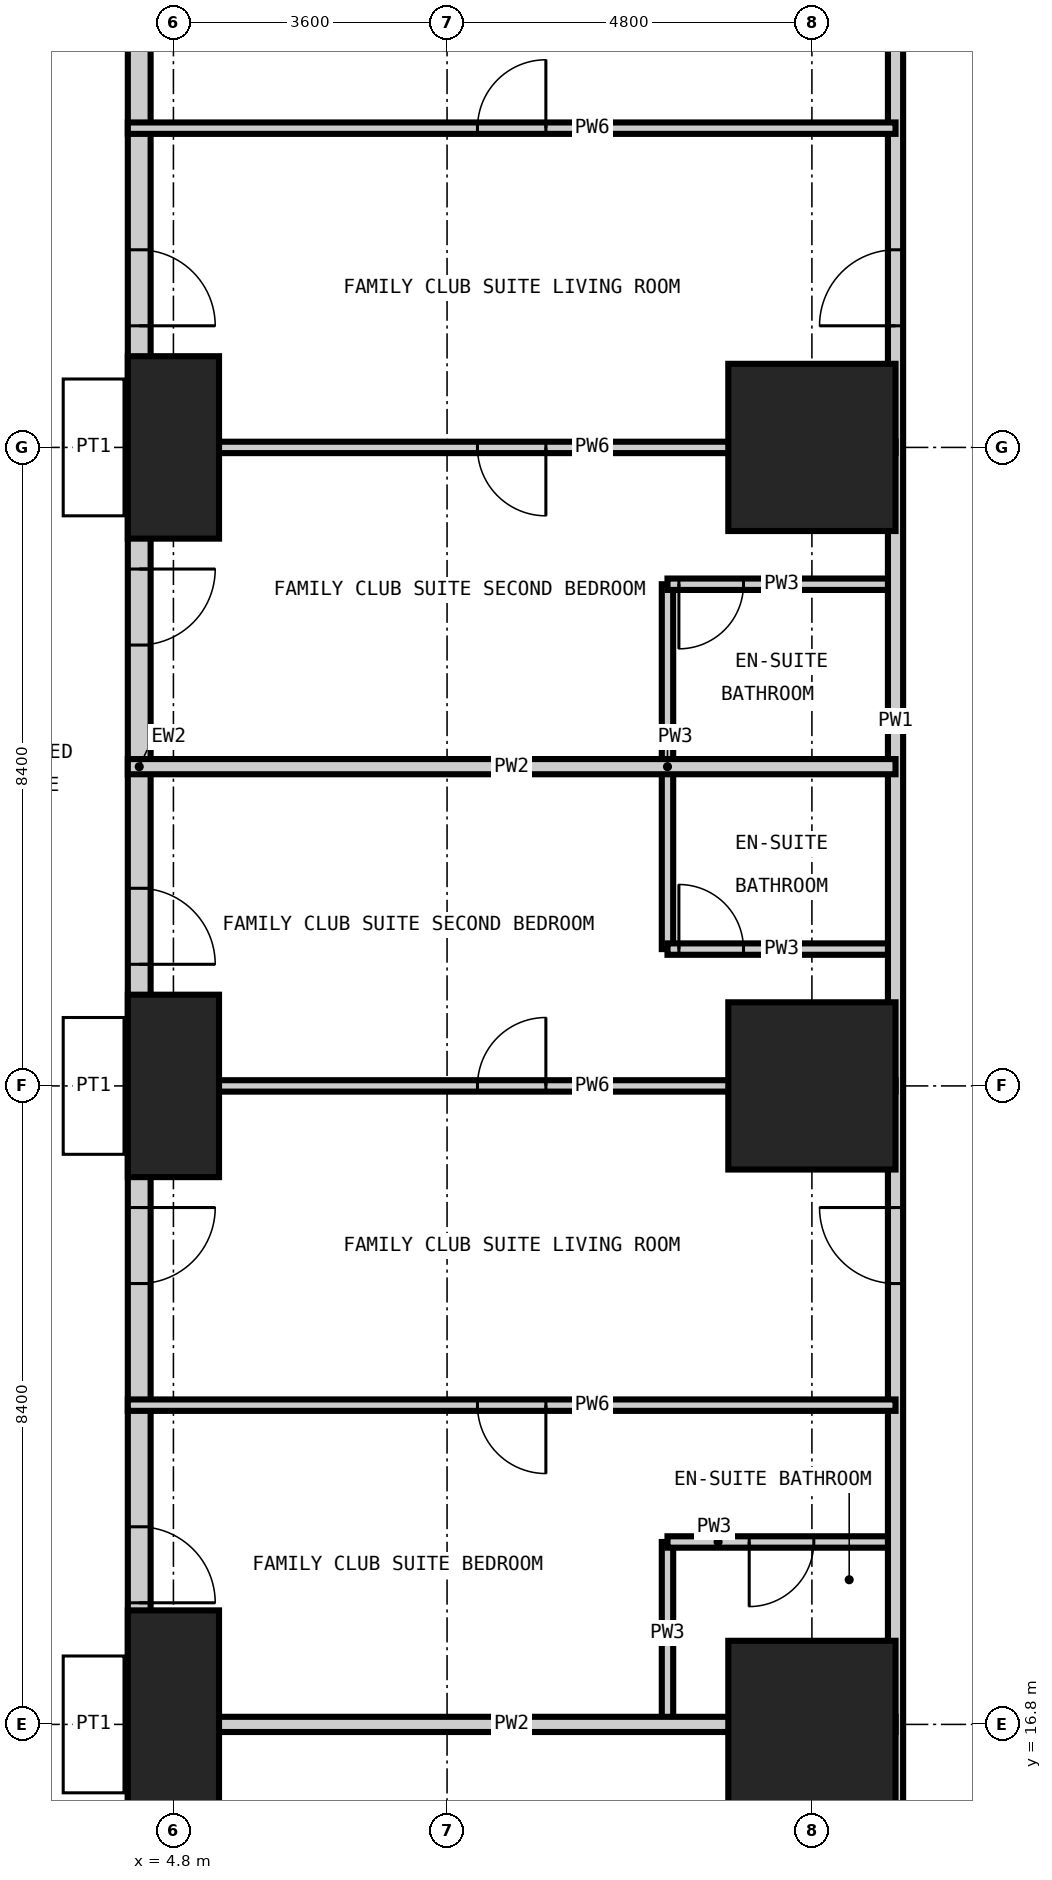
"""IFC4 building model, lengths in metres.
Left out: names, types, materials, properties, quantities, classifications, styles, units other than length and angle.
Written with IfcOpenShell. Run it as: python <this file> out.ifc"""

import sys

from ifc_helpers import new_model, si_unit, direction, frame, frame_2d, origin, origin_2d, place, context, subcontext, project, spatial, rectangle, extrude, element, fill, save


model = new_model("IFC4")
c1 = context("Model", 3, precision=1e-05, world=origin(), true_north=direction((0.0, 1.0)))
c2 = subcontext(c1, "Body", "Model", "MODEL_VIEW")
j1 = project(units=[si_unit("LENGTHUNIT", "METRE"), si_unit("PLANEANGLEUNIT", "RADIAN")], contexts=[c1])
p1 = place(None, origin())
s1 = spatial("IfcSite", under=j1, at=p1, CompositionType="ELEMENT")
p2 = place(p1, origin())
s2 = spatial("IfcBuilding", under=s1, at=p2, CompositionType="ELEMENT")
p3 = place(p2, frame((0.0, 0.0, 159.0)))
s3 = spatial("IfcBuildingStorey", under=s2, at=p3, CompositionType="ELEMENT", Elevation=159.0)
p4 = place(p3, frame((4.8, 16.8, -0.35), z_axis=(0.0, 0.0, 1.0), x_axis=(1.0, 0.0, 0.0)))
e1 = element("IfcColumn", 1, at=p4, inside=s3, PredefinedType="COLUMN", context=c2, shape_type="SweptSolid", body=[
    extrude(rectangle(XDim=1.2, YDim=3.0, at=origin_2d()), origin(), (0.0, 0.0, 1.0), 3.6),
])
for number, where, z_axis, x_axis in (
    (2, (4.8, 25.2, -0.35), (0.0, 0.0, 1.0), (1.0, 0.0, 0.0)),
    (3, (4.8, 33.6, -0.35), (0.0, 0.0, 1.0), (1.0, 0.0, 0.0)),
):
    element("IfcColumn", number, at=place(p3, frame(where, z_axis=z_axis, x_axis=x_axis)), inside=s3, PredefinedType="COLUMN", context=c2, shape_type="SweptSolid", body=[
        extrude(rectangle(XDim=1.2, YDim=2.4, at=origin_2d()), origin(), (0.0, 0.0, 1.0), 3.6),
    ])
for number, where, z_axis, x_axis in (
    (4, (13.2, 16.8, -0.35), (0.0, 0.0, 1.0), (1.0, 0.0, 0.0)),
    (5, (13.2, 25.2, -0.35), (0.0, 0.0, 1.0), (1.0, 0.0, 0.0)),
    (6, (13.2, 33.6, -0.35), (0.0, 0.0, 1.0), (1.0, 0.0, 0.0)),
):
    element("IfcColumn", number, at=place(p3, frame(where, z_axis=z_axis, x_axis=x_axis)), inside=s3, PredefinedType="COLUMN", context=c2, shape_type="SweptSolid", body=[
        extrude(rectangle(XDim=2.2, YDim=2.2, at=origin_2d()), origin(), (0.0, 0.0, 1.0), 3.6),
    ])
p5 = place(p3, frame((4.35, 51.9, 0.0), z_axis=(0.0, 0.0, 1.0), x_axis=(0.0, -1.0, 0.0)))
e7 = element("IfcWall", 7, at=p5, inside=s3, PredefinedType="SOLIDWALL", context=c2, shape_type="SweptSolid", body=[
    extrude(rectangle(XDim=45.0, YDim=0.3, at=frame_2d((22.5, 0.0))), origin(), (0.0, 0.0, 1.0), 3.25),
])
p6 = place(p5, frame((41.25, 0.0, 0.0)))
e8 = element("IfcOpeningElement", 8, at=p6, cuts=e7, PredefinedType="OPENING", context=c2, shape_type="SweptSolid", body=[
    extrude(rectangle(XDim=1.0, YDim=2.4, at=frame_2d((0.5, 1.2))), frame((0.0, 0.16, 0.0), z_axis=(0.0, -1.0, 0.0), x_axis=(1.0, 0.0, 0.0)), (0.0, 0.0, 1.0), 0.32),
])
p7 = place(p5, frame((36.7, 0.0, 0.0)))
e9 = element("IfcOpeningElement", 9, at=p7, cuts=e7, PredefinedType="OPENING", context=c2, shape_type="SweptSolid", body=[
    extrude(rectangle(XDim=1.0, YDim=2.4, at=frame_2d((0.5, 1.2))), frame((0.0, 0.16, 0.0), z_axis=(0.0, -1.0, 0.0), x_axis=(1.0, 0.0, 0.0)), (0.0, 0.0, 1.0), 0.32),
])
p8 = place(p5, frame((32.5, 0.0, 0.0)))
e10 = element("IfcOpeningElement", 10, at=p8, cuts=e7, PredefinedType="OPENING", context=c2, shape_type="SweptSolid", body=[
    extrude(rectangle(XDim=1.0, YDim=2.4, at=frame_2d((0.5, 1.2))), frame((0.0, 0.16, 0.0), z_axis=(0.0, -1.0, 0.0), x_axis=(1.0, 0.0, 0.0)), (0.0, 0.0, 1.0), 0.32),
])
p9 = place(p5, frame((28.3, 0.0, 0.0)))
e11 = element("IfcOpeningElement", 11, at=p9, cuts=e7, PredefinedType="OPENING", context=c2, shape_type="SweptSolid", body=[
    extrude(rectangle(XDim=1.0, YDim=2.4, at=frame_2d((0.5, 1.2))), frame((0.0, 0.16, 0.0), z_axis=(0.0, -1.0, 0.0), x_axis=(1.0, 0.0, 0.0)), (0.0, 0.0, 1.0), 0.32),
])
p10 = place(p5, frame((24.1, 0.0, 0.0)))
e12 = element("IfcOpeningElement", 12, at=p10, cuts=e7, PredefinedType="OPENING", context=c2, shape_type="SweptSolid", body=[
    extrude(rectangle(XDim=1.0, YDim=2.4, at=frame_2d((0.5, 1.2))), frame((0.0, 0.16, 0.0), z_axis=(0.0, -1.0, 0.0), x_axis=(1.0, 0.0, 0.0)), (0.0, 0.0, 1.0), 0.32),
])
p11 = place(p5, frame((19.9, 0.0, 0.0)))
e13 = element("IfcOpeningElement", 13, at=p11, cuts=e7, PredefinedType="OPENING", context=c2, shape_type="SweptSolid", body=[
    extrude(rectangle(XDim=1.0, YDim=2.4, at=frame_2d((0.5, 1.2))), frame((0.0, 0.16, 0.0), z_axis=(0.0, -1.0, 0.0), x_axis=(1.0, 0.0, 0.0)), (0.0, 0.0, 1.0), 0.32),
])
p12 = place(p5, frame((15.7, 0.0, 0.0)))
e14 = element("IfcOpeningElement", 14, at=p12, cuts=e7, PredefinedType="OPENING", context=c2, shape_type="SweptSolid", body=[
    extrude(rectangle(XDim=1.0, YDim=2.4, at=frame_2d((0.5, 1.2))), frame((0.0, 0.16, 0.0), z_axis=(0.0, -1.0, 0.0), x_axis=(1.0, 0.0, 0.0)), (0.0, 0.0, 1.0), 0.32),
])
p13 = place(p5, frame((11.5, 0.0, 0.0)))
e15 = element("IfcOpeningElement", 15, at=p13, cuts=e7, PredefinedType="OPENING", context=c2, shape_type="SweptSolid", body=[
    extrude(rectangle(XDim=1.0, YDim=2.4, at=frame_2d((0.5, 1.2))), frame((0.0, 0.16, 0.0), z_axis=(0.0, -1.0, 0.0), x_axis=(1.0, 0.0, 0.0)), (0.0, 0.0, 1.0), 0.32),
])
p14 = place(p5, frame((7.3, 0.0, 0.0)))
e16 = element("IfcOpeningElement", 16, at=p14, cuts=e7, PredefinedType="OPENING", context=c2, shape_type="SweptSolid", body=[
    extrude(rectangle(XDim=1.0, YDim=2.4, at=frame_2d((0.5, 1.2))), frame((0.0, 0.16, 0.0), z_axis=(0.0, -1.0, 0.0), x_axis=(1.0, 0.0, 0.0)), (0.0, 0.0, 1.0), 0.32),
])
p15 = place(p5, frame((2.75, 0.0, 0.0)))
e17 = element("IfcOpeningElement", 17, at=p15, cuts=e7, PredefinedType="OPENING", context=c2, shape_type="SweptSolid", body=[
    extrude(rectangle(XDim=1.0, YDim=2.4, at=frame_2d((0.5, 1.2))), frame((0.0, 0.16, 0.0), z_axis=(0.0, -1.0, 0.0), x_axis=(1.0, 0.0, 0.0)), (0.0, 0.0, 1.0), 0.32),
])
p16 = place(p3, frame((11.3, 16.8, 0.0), z_axis=(0.0, 0.0, 1.0), x_axis=(0.0, 1.0, 0.0)))
e18 = element("IfcWall", 18, at=p16, inside=s3, PredefinedType="PARTITIONING", context=c2, shape_type="SweptSolid", body=[
    extrude(rectangle(XDim=2.4, YDim=0.15, at=frame_2d((1.2, 0.0))), origin(), (0.0, 0.0, 1.0), 3.25),
])
p17 = place(p3, frame((11.3, 27.0, 0.0), z_axis=(0.0, 0.0, 1.0), x_axis=(0.0, 1.0, 0.0)))
e19 = element("IfcWall", 19, at=p17, inside=s3, PredefinedType="PARTITIONING", context=c2, shape_type="SweptSolid", body=[
    extrude(rectangle(XDim=4.8, YDim=0.15, at=frame_2d((2.4, 0.0))), origin(), (0.0, 0.0, 1.0), 3.25),
])
p18 = place(p3, frame((11.3, 19.2, 0.0), z_axis=(0.0, 0.0, 1.0), x_axis=(1.0, 0.0, 0.0)))
e20 = element("IfcWall", 20, at=p18, inside=s3, PredefinedType="PARTITIONING", context=c2, shape_type="SweptSolid", body=[
    extrude(rectangle(XDim=3.0, YDim=0.15, at=frame_2d((1.5, 0.0))), origin(), (0.0, 0.0, 1.0), 3.25),
])
p19 = place(p18, frame((1.075, 0.0, 0.0)))
e21 = element("IfcOpeningElement", 21, at=p19, cuts=e20, PredefinedType="OPENING", context=c2, shape_type="SweptSolid", body=[
    extrude(rectangle(XDim=0.85, YDim=2.1, at=frame_2d((0.425, 1.05))), frame((0.0, 0.085, 0.0), z_axis=(0.0, -1.0, 0.0), x_axis=(1.0, 0.0, 0.0)), (0.0, 0.0, 1.0), 0.17),
])
p20 = place(p3, frame((11.3, 27.0, 0.0), z_axis=(0.0, 0.0, 1.0), x_axis=(1.0, 0.0, 0.0)))
e22 = element("IfcWall", 22, at=p20, inside=s3, PredefinedType="PARTITIONING", context=c2, shape_type="SweptSolid", body=[
    extrude(rectangle(XDim=3.0, YDim=0.15, at=frame_2d((1.5, 0.0))), origin(), (0.0, 0.0, 1.0), 3.25),
])
p21 = place(p20, frame((0.15, 0.0, 0.0)))
e23 = element("IfcOpeningElement", 23, at=p21, cuts=e22, PredefinedType="OPENING", context=c2, shape_type="SweptSolid", body=[
    extrude(rectangle(XDim=0.85, YDim=2.1, at=frame_2d((0.425, 1.05))), frame((0.0, 0.085, 0.0), z_axis=(0.0, -1.0, 0.0), x_axis=(1.0, 0.0, 0.0)), (0.0, 0.0, 1.0), 0.17),
])
p22 = place(p3, frame((11.3, 31.8, 0.0), z_axis=(0.0, 0.0, 1.0), x_axis=(1.0, 0.0, 0.0)))
e24 = element("IfcWall", 24, at=p22, inside=s3, PredefinedType="PARTITIONING", context=c2, shape_type="SweptSolid", body=[
    extrude(rectangle(XDim=3.0, YDim=0.15, at=frame_2d((1.5, 0.0))), origin(), (0.0, 0.0, 1.0), 3.25),
])
p23 = place(p22, frame((0.15, 0.0, 0.0)))
e25 = element("IfcOpeningElement", 25, at=p23, cuts=e24, PredefinedType="OPENING", context=c2, shape_type="SweptSolid", body=[
    extrude(rectangle(XDim=0.85, YDim=2.1, at=frame_2d((0.425, 1.05))), frame((0.0, 0.085, 0.0), z_axis=(0.0, -1.0, 0.0), x_axis=(1.0, 0.0, 0.0)), (0.0, 0.0, 1.0), 0.17),
])
p24 = place(p3, frame((14.3, 14.3, 0.0), z_axis=(0.0, 0.0, 1.0), x_axis=(0.0, 1.0, 0.0)))
e26 = element("IfcWall", 26, at=p24, inside=s3, PredefinedType="PARTITIONING", context=c2, shape_type="SweptSolid", body=[
    extrude(rectangle(XDim=31.4, YDim=0.2, at=frame_2d((15.7, 0.0))), origin(), (0.0, 0.0, 1.0), 3.25),
])
p25 = place(p24, frame((8.3, 0.0, 0.0)))
e27 = element("IfcOpeningElement", 27, at=p25, cuts=e26, PredefinedType="OPENING", context=c2, shape_type="SweptSolid", body=[
    extrude(rectangle(XDim=1.0, YDim=2.2, at=frame_2d((0.5, 1.1))), frame((0.0, 0.11, 0.0), z_axis=(0.0, -1.0, 0.0), x_axis=(1.0, 0.0, 0.0)), (0.0, 0.0, 1.0), 0.22),
])
p26 = place(p24, frame((20.9, 0.0, 0.0)))
e28 = element("IfcOpeningElement", 28, at=p26, cuts=e26, PredefinedType="OPENING", context=c2, shape_type="SweptSolid", body=[
    extrude(rectangle(XDim=1.0, YDim=2.2, at=frame_2d((0.5, 1.1))), frame((0.0, 0.11, 0.0), z_axis=(0.0, -1.0, 0.0), x_axis=(1.0, 0.0, 0.0)), (0.0, 0.0, 1.0), 0.22),
])
p27 = place(p24, frame((0.35, 0.0, 0.0)))
e29 = element("IfcOpeningElement", 29, at=p27, cuts=e26, PredefinedType="OPENING", context=c2, shape_type="SweptSolid", body=[
    extrude(rectangle(XDim=1.0, YDim=2.2, at=frame_2d((0.5, 1.1))), frame((0.0, 0.11, 0.0), z_axis=(0.0, -1.0, 0.0), x_axis=(1.0, 0.0, 0.0)), (0.0, 0.0, 1.0), 0.22),
])
p28 = place(p24, frame((29.05, 0.0, 0.0)))
e30 = element("IfcOpeningElement", 30, at=p28, cuts=e26, PredefinedType="OPENING", context=c2, shape_type="SweptSolid", body=[
    extrude(rectangle(XDim=1.0, YDim=2.2, at=frame_2d((0.5, 1.1))), frame((0.0, 0.11, 0.0), z_axis=(0.0, -1.0, 0.0), x_axis=(1.0, 0.0, 0.0)), (0.0, 0.0, 1.0), 0.22),
])
for number, where, z_axis, x_axis in (
    (31, (4.2, 16.8, 0.0), (0.0, 0.0, 1.0), (1.0, 0.0, 0.0)),
    (32, (4.2, 29.4, 0.0), (0.0, 0.0, 1.0), (1.0, 0.0, 0.0)),
):
    element("IfcWall", number, at=place(p3, frame(where, z_axis=z_axis, x_axis=x_axis)), inside=s3, PredefinedType="PARTITIONING", context=c2, shape_type="SweptSolid", body=[
        extrude(rectangle(XDim=10.1, YDim=0.2, at=frame_2d((5.05, 0.0))), origin(), (0.0, 0.0, 1.0), 3.25),
    ])
p29 = place(p3, frame((4.2, 21.0, 0.0), z_axis=(0.0, 0.0, 1.0), x_axis=(1.0, 0.0, 0.0)))
e33 = element("IfcWall", 33, at=p29, inside=s3, PredefinedType="PARTITIONING", context=c2, shape_type="SweptSolid", body=[
    extrude(rectangle(XDim=10.1, YDim=0.15, at=frame_2d((5.05, 0.0))), origin(), (0.0, 0.0, 1.0), 3.25),
])
p30 = place(p29, frame((4.6, 0.0, 0.0)))
e34 = element("IfcOpeningElement", 34, at=p30, cuts=e33, PredefinedType="OPENING", context=c2, shape_type="SweptSolid", body=[
    extrude(rectangle(XDim=0.9, YDim=2.1, at=frame_2d((0.45, 1.05))), frame((0.0, 0.085, 0.0), z_axis=(0.0, -1.0, 0.0), x_axis=(1.0, 0.0, 0.0)), (0.0, 0.0, 1.0), 0.17),
])
p31 = place(p3, frame((4.2, 25.2, 0.0), z_axis=(0.0, 0.0, 1.0), x_axis=(1.0, 0.0, 0.0)))
e35 = element("IfcWall", 35, at=p31, inside=s3, PredefinedType="PARTITIONING", context=c2, shape_type="SweptSolid", body=[
    extrude(rectangle(XDim=10.1, YDim=0.15, at=frame_2d((5.05, 0.0))), origin(), (0.0, 0.0, 1.0), 3.25),
])
p32 = place(p31, frame((4.6, 0.0, 0.0)))
e36 = element("IfcOpeningElement", 36, at=p32, cuts=e35, PredefinedType="OPENING", context=c2, shape_type="SweptSolid", body=[
    extrude(rectangle(XDim=0.9, YDim=2.1, at=frame_2d((0.45, 1.05))), frame((0.0, 0.085, 0.0), z_axis=(0.0, -1.0, 0.0), x_axis=(1.0, 0.0, 0.0)), (0.0, 0.0, 1.0), 0.17),
])
p33 = place(p3, frame((4.2, 33.6, 0.0), z_axis=(0.0, 0.0, 1.0), x_axis=(1.0, 0.0, 0.0)))
e37 = element("IfcWall", 37, at=p33, inside=s3, PredefinedType="PARTITIONING", context=c2, shape_type="SweptSolid", body=[
    extrude(rectangle(XDim=10.1, YDim=0.15, at=frame_2d((5.05, 0.0))), origin(), (0.0, 0.0, 1.0), 3.25),
])
p34 = place(p33, frame((4.6, 0.0, 0.0)))
e38 = element("IfcOpeningElement", 38, at=p34, cuts=e37, PredefinedType="OPENING", context=c2, shape_type="SweptSolid", body=[
    extrude(rectangle(XDim=0.9, YDim=2.1, at=frame_2d((0.45, 1.05))), frame((0.0, 0.085, 0.0), z_axis=(0.0, -1.0, 0.0), x_axis=(1.0, 0.0, 0.0)), (0.0, 0.0, 1.0), 0.17),
])
p35 = place(p3, frame((4.2, 37.8, 0.0), z_axis=(0.0, 0.0, 1.0), x_axis=(1.0, 0.0, 0.0)))
e39 = element("IfcWall", 39, at=p35, inside=s3, PredefinedType="PARTITIONING", context=c2, shape_type="SweptSolid", body=[
    extrude(rectangle(XDim=10.1, YDim=0.15, at=frame_2d((5.05, 0.0))), origin(), (0.0, 0.0, 1.0), 3.25),
])
p36 = place(p35, frame((4.6, 0.0, 0.0)))
e40 = element("IfcOpeningElement", 40, at=p36, cuts=e39, PredefinedType="OPENING", context=c2, shape_type="SweptSolid", body=[
    extrude(rectangle(XDim=0.9, YDim=2.1, at=frame_2d((0.45, 1.05))), frame((0.0, 0.085, 0.0), z_axis=(0.0, -1.0, 0.0), x_axis=(1.0, 0.0, 0.0)), (0.0, 0.0, 1.0), 0.17),
])
p37 = place(p8, origin())
e41 = element("IfcDoor", 41, at=p37, inside=s3, OperationType="SINGLE_SWING_RIGHT", PredefinedType="DOOR", context=c2, shape_type="SweptSolid", body=[
    extrude(rectangle(XDim=1.0, YDim=2.4, at=frame_2d((0.5, 1.2))), frame((0.0, 0.025, 0.0), z_axis=(0.0, -1.0, 0.0), x_axis=(1.0, 0.0, 0.0)), (0.0, 0.0, 1.0), 0.05),
])
fill(e10, e41)
p38 = place(p9, origin())
e42 = element("IfcDoor", 42, at=p38, inside=s3, OperationType="SINGLE_SWING_LEFT", PredefinedType="DOOR", context=c2, shape_type="SweptSolid", body=[
    extrude(rectangle(XDim=1.0, YDim=2.4, at=frame_2d((0.5, 1.2))), frame((0.0, 0.025, 0.0), z_axis=(0.0, -1.0, 0.0), x_axis=(1.0, 0.0, 0.0)), (0.0, 0.0, 1.0), 0.05),
])
fill(e11, e42)
p39 = place(p10, origin())
e43 = element("IfcDoor", 43, at=p39, inside=s3, OperationType="SINGLE_SWING_RIGHT", PredefinedType="DOOR", context=c2, shape_type="SweptSolid", body=[
    extrude(rectangle(XDim=1.0, YDim=2.4, at=frame_2d((0.5, 1.2))), frame((0.0, 0.025, 0.0), z_axis=(0.0, -1.0, 0.0), x_axis=(1.0, 0.0, 0.0)), (0.0, 0.0, 1.0), 0.05),
])
fill(e12, e43)
p40 = place(p11, origin())
e44 = element("IfcDoor", 44, at=p40, inside=s3, OperationType="SINGLE_SWING_LEFT", PredefinedType="DOOR", context=c2, shape_type="SweptSolid", body=[
    extrude(rectangle(XDim=1.0, YDim=2.4, at=frame_2d((0.5, 1.2))), frame((0.0, 0.025, 0.0), z_axis=(0.0, -1.0, 0.0), x_axis=(1.0, 0.0, 0.0)), (0.0, 0.0, 1.0), 0.05),
])
fill(e13, e44)
p41 = place(p12, origin())
e45 = element("IfcDoor", 45, at=p41, inside=s3, OperationType="SINGLE_SWING_RIGHT", PredefinedType="DOOR", context=c2, shape_type="SweptSolid", body=[
    extrude(rectangle(XDim=1.0, YDim=2.4, at=frame_2d((0.5, 1.2))), frame((0.0, 0.025, 0.0), z_axis=(0.0, -1.0, 0.0), x_axis=(1.0, 0.0, 0.0)), (0.0, 0.0, 1.0), 0.05),
])
fill(e14, e45)
p42 = place(p25, origin())
e46 = element("IfcDoor", 46, at=p42, inside=s3, OperationType="SINGLE_SWING_RIGHT", PredefinedType="DOOR", context=c2, shape_type="SweptSolid", body=[
    extrude(rectangle(XDim=1.0, YDim=2.2, at=frame_2d((0.5, 1.1))), frame((0.0, 0.025, 0.0), z_axis=(0.0, -1.0, 0.0), x_axis=(1.0, 0.0, 0.0)), (0.0, 0.0, 1.0), 0.05),
])
fill(e27, e46)
p43 = place(p30, frame((0.9, 0.0, 0.0), z_axis=(0.0, 0.0, 1.0), x_axis=(-1.0, 0.0, 0.0)))
e47 = element("IfcDoor", 47, at=p43, inside=s3, OperationType="SINGLE_SWING_LEFT", PredefinedType="DOOR", context=c2, shape_type="SweptSolid", body=[
    extrude(rectangle(XDim=0.9, YDim=2.1, at=frame_2d((0.45, 1.05))), frame((0.0, 0.025, 0.0), z_axis=(0.0, -1.0, 0.0), x_axis=(1.0, 0.0, 0.0)), (0.0, 0.0, 1.0), 0.05),
])
fill(e34, e47)
p44 = place(p19, frame((0.85, 0.0, 0.0), z_axis=(0.0, 0.0, 1.0), x_axis=(-1.0, 0.0, 0.0)))
e48 = element("IfcDoor", 48, at=p44, inside=s3, OperationType="SINGLE_SWING_RIGHT", PredefinedType="DOOR", context=c2, shape_type="SweptSolid", body=[
    extrude(rectangle(XDim=0.85, YDim=2.1, at=frame_2d((0.425, 1.05))), frame((0.0, 0.025, 0.0), z_axis=(0.0, -1.0, 0.0), x_axis=(1.0, 0.0, 0.0)), (0.0, 0.0, 1.0), 0.05),
])
fill(e21, e48)
p45 = place(p32, origin())
e49 = element("IfcDoor", 49, at=p45, inside=s3, OperationType="SINGLE_SWING_RIGHT", PredefinedType="DOOR", context=c2, shape_type="SweptSolid", body=[
    extrude(rectangle(XDim=0.9, YDim=2.1, at=frame_2d((0.45, 1.05))), frame((0.0, 0.025, 0.0), z_axis=(0.0, -1.0, 0.0), x_axis=(1.0, 0.0, 0.0)), (0.0, 0.0, 1.0), 0.05),
])
fill(e36, e49)
p46 = place(p21, origin())
e50 = element("IfcDoor", 50, at=p46, inside=s3, OperationType="SINGLE_SWING_LEFT", PredefinedType="DOOR", context=c2, shape_type="SweptSolid", body=[
    extrude(rectangle(XDim=0.85, YDim=2.1, at=frame_2d((0.425, 1.05))), frame((0.0, 0.025, 0.0), z_axis=(0.0, -1.0, 0.0), x_axis=(1.0, 0.0, 0.0)), (0.0, 0.0, 1.0), 0.05),
])
fill(e23, e50)
p47 = place(p26, origin())
e51 = element("IfcDoor", 51, at=p47, inside=s3, OperationType="SINGLE_SWING_LEFT", PredefinedType="DOOR", context=c2, shape_type="SweptSolid", body=[
    extrude(rectangle(XDim=1.0, YDim=2.2, at=frame_2d((0.5, 1.1))), frame((0.0, 0.025, 0.0), z_axis=(0.0, -1.0, 0.0), x_axis=(1.0, 0.0, 0.0)), (0.0, 0.0, 1.0), 0.05),
])
fill(e28, e51)
p48 = place(p36, origin())
e52 = element("IfcDoor", 52, at=p48, inside=s3, OperationType="SINGLE_SWING_RIGHT", PredefinedType="DOOR", context=c2, shape_type="SweptSolid", body=[
    extrude(rectangle(XDim=0.9, YDim=2.1, at=frame_2d((0.45, 1.05))), frame((0.0, 0.025, 0.0), z_axis=(0.0, -1.0, 0.0), x_axis=(1.0, 0.0, 0.0)), (0.0, 0.0, 1.0), 0.05),
])
fill(e40, e52)
p49 = place(p34, frame((0.9, 0.0, 0.0), z_axis=(0.0, 0.0, 1.0), x_axis=(-1.0, 0.0, 0.0)))
e53 = element("IfcDoor", 53, at=p49, inside=s3, OperationType="SINGLE_SWING_LEFT", PredefinedType="DOOR", context=c2, shape_type="SweptSolid", body=[
    extrude(rectangle(XDim=0.9, YDim=2.1, at=frame_2d((0.45, 1.05))), frame((0.0, 0.025, 0.0), z_axis=(0.0, -1.0, 0.0), x_axis=(1.0, 0.0, 0.0)), (0.0, 0.0, 1.0), 0.05),
])
fill(e38, e53)
p50 = place(p23, frame((0.85, 0.0, 0.0), z_axis=(0.0, 0.0, 1.0), x_axis=(-1.0, 0.0, 0.0)))
e54 = element("IfcDoor", 54, at=p50, inside=s3, OperationType="SINGLE_SWING_RIGHT", PredefinedType="DOOR", context=c2, shape_type="SweptSolid", body=[
    extrude(rectangle(XDim=0.85, YDim=2.1, at=frame_2d((0.425, 1.05))), frame((0.0, 0.025, 0.0), z_axis=(0.0, -1.0, 0.0), x_axis=(1.0, 0.0, 0.0)), (0.0, 0.0, 1.0), 0.05),
])
fill(e25, e54)
save(model, sys.argv[1])
